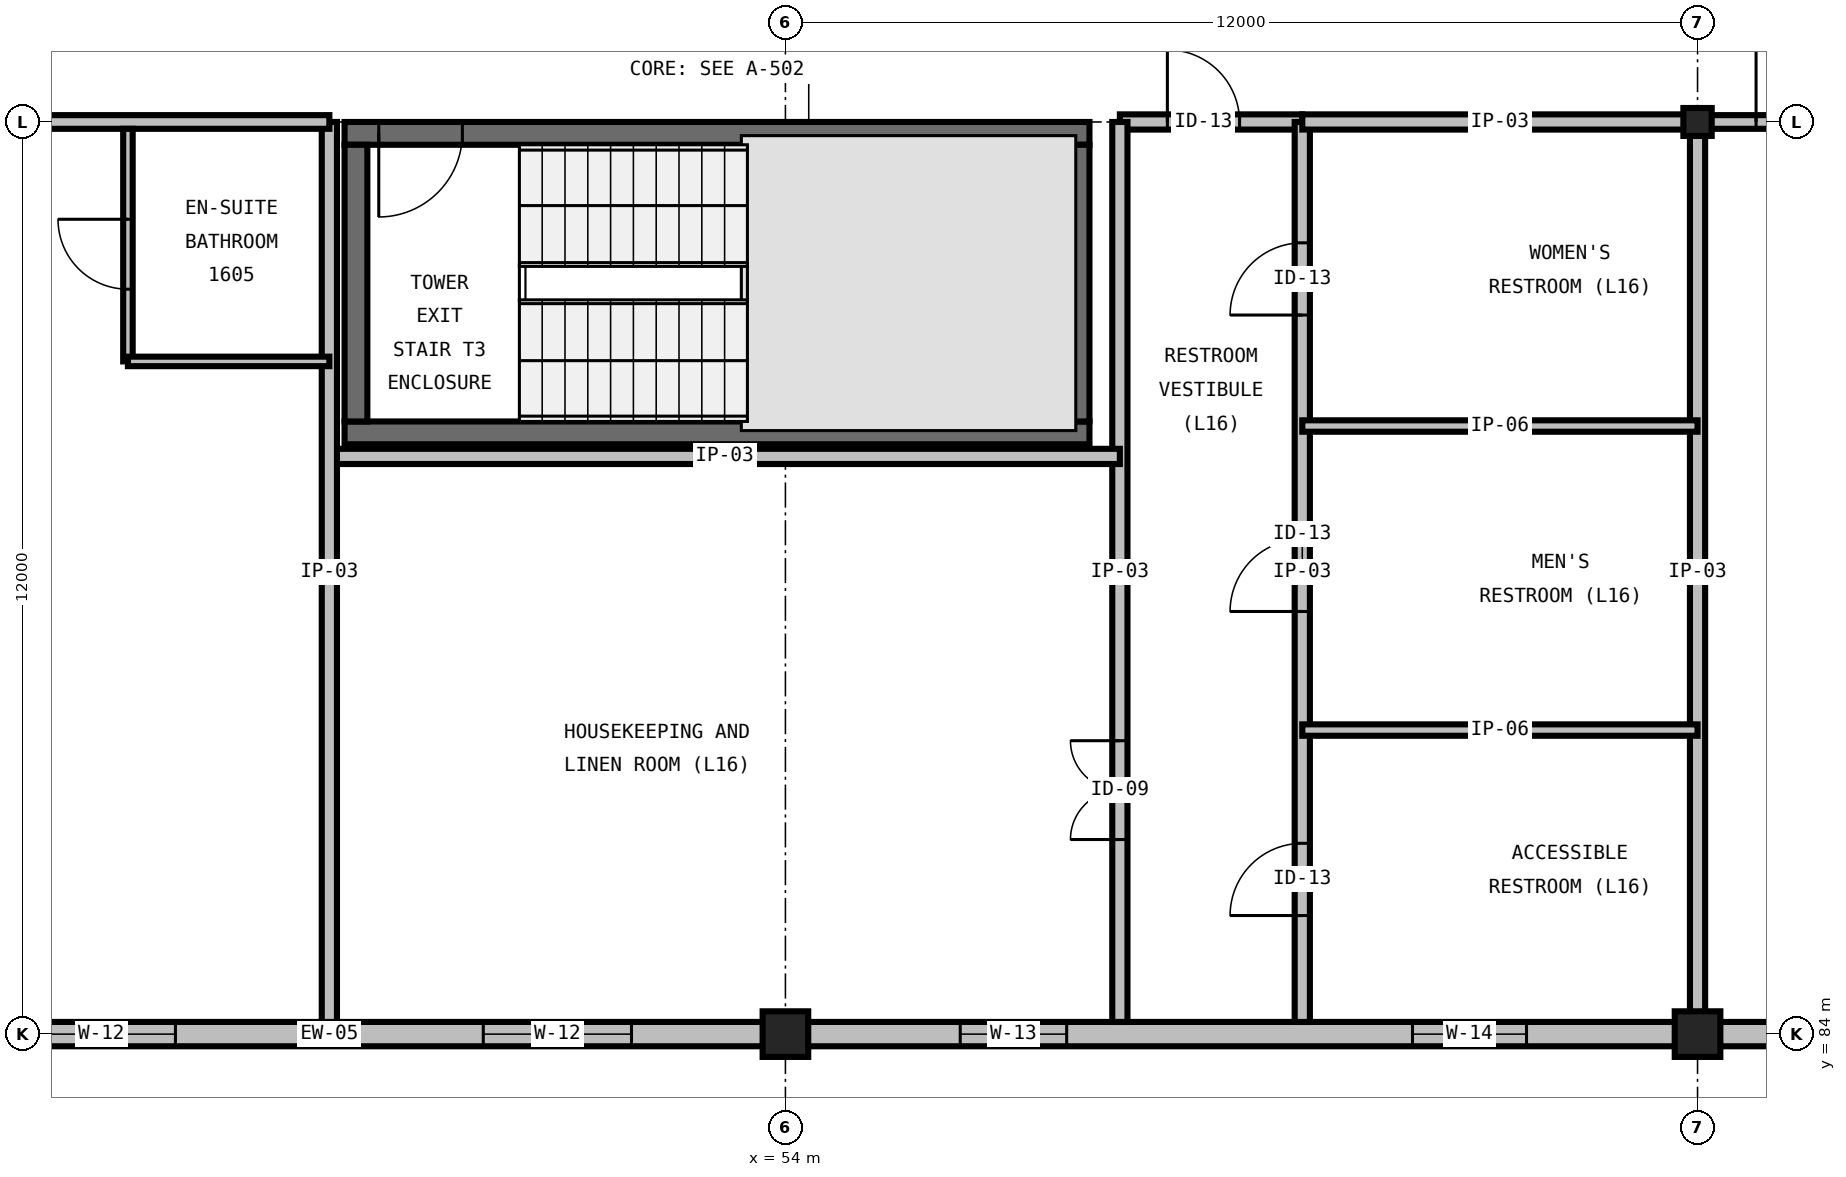
"""IFC4 building model, lengths in metres.
Left out: names, types, materials, properties, quantities, classifications, styles, units other than length and angle.
Written with IfcOpenShell. Run it as: python <this file> out.ifc"""

import sys

from ifc_helpers import new_model, si_unit, direction, frame, frame_2d, origin, origin_2d, place, context, subcontext, project, spatial, rectangle, i_section, extrude, element, fill, save


model = new_model("IFC4")
c1 = context("Model", 3, precision=1e-05, world=origin(), true_north=direction((0.0, 1.0)))
c2 = subcontext(c1, "Body", "Model", "MODEL_VIEW")
j1 = project(units=[si_unit("LENGTHUNIT", "METRE"), si_unit("PLANEANGLEUNIT", "RADIAN")], contexts=[c1])
p1 = place(None, origin())
s1 = spatial("IfcSite", under=j1, at=p1, CompositionType="ELEMENT")
p2 = place(p1, origin())
s2 = spatial("IfcBuilding", under=s1, at=p2, CompositionType="ELEMENT")
p3 = place(p2, frame((0.0, 0.0, 67.2)))
s3 = spatial("IfcBuildingStorey", under=s2, at=p3, CompositionType="ELEMENT", Elevation=67.2)
for number, where, z_axis, x_axis in (
    (1, (54.0, 84.0, 0.0), (0.0, 0.0, 1.0), (1.0, 0.0, 0.0)),
    (2, (66.0, 84.0, 0.0), (0.0, 0.0, 1.0), (1.0, 0.0, 0.0)),
):
    element("IfcColumn", number, at=place(p3, frame(where, z_axis=z_axis, x_axis=x_axis)), inside=s3, PredefinedType="COLUMN", context=c2, shape_type="SweptSolid", body=[
        extrude(rectangle(XDim=0.6, YDim=0.6, at=origin_2d()), origin(), (0.0, 0.0, 1.0), 3.6),
    ])
p4 = place(p3, frame((66.0, 96.0, 0.0), z_axis=(0.0, 0.0, 1.0), x_axis=(1.0, 0.0, 0.0)))
e3 = element("IfcColumn", 3, at=p4, inside=s3, PredefinedType="COLUMN", context=c2, shape_type="SweptSolid", body=[
    extrude(i_section(OverallWidth=0.373, OverallDepth=0.368, WebThickness=0.015, FlangeThickness=0.024, FilletRadius=0.031, at=origin_2d()), origin(), (0.0, 0.0, 1.0), 3.6),
])
p5 = place(p3, frame((48.2, 91.91, 0.0), z_axis=(0.0, 0.0, 1.0), x_axis=(1.0, 0.0, 0.0)))
e4 = element("IfcWall", 4, at=p5, inside=s3, PredefinedType="SHEAR", context=c2, shape_type="SweptSolid", body=[
    extrude(rectangle(XDim=9.8, YDim=0.3, at=frame_2d((4.9, 0.0))), origin(), (0.0, 0.0, 1.0), 3.6),
])
p6 = place(p3, frame((58.0, 95.85, 0.0), z_axis=(0.0, 0.0, 1.0), x_axis=(-1.0, 0.0, 0.0)))
e5 = element("IfcWall", 5, at=p6, inside=s3, PredefinedType="SHEAR", context=c2, shape_type="SweptSolid", body=[
    extrude(rectangle(XDim=9.8, YDim=0.3, at=frame_2d((4.9, 0.0))), origin(), (0.0, 0.0, 1.0), 3.6),
])
p7 = place(p6, frame((8.25, 0.0, 0.0)))
e6 = element("IfcOpeningElement", 6, at=p7, cuts=e5, PredefinedType="OPENING", context=c2, shape_type="SweptSolid", body=[
    extrude(rectangle(XDim=1.1, YDim=2.2, at=frame_2d((0.55, 1.1))), frame((0.0, 0.165, 0.0), z_axis=(0.0, -1.0, 0.0), x_axis=(1.0, 0.0, 0.0)), (0.0, 0.0, 1.0), 0.33),
])
for number, where, z_axis, x_axis in (
    (7, (48.35, 95.7, 0.0), (0.0, 0.0, 1.0), (0.0, -1.0, 0.0)),
    (8, (57.85, 92.06, 0.0), (0.0, 0.0, 1.0), (0.0, 1.0, 0.0)),
):
    element("IfcWall", number, at=place(p3, frame(where, z_axis=z_axis, x_axis=x_axis)), inside=s3, PredefinedType="SHEAR", context=c2, shape_type="SweptSolid", body=[
        extrude(rectangle(XDim=3.64, YDim=0.3, at=frame_2d((1.82, 0.0))), origin(), (0.0, 0.0, 1.0), 3.6),
    ])
p8 = place(p3, frame((42.0, 84.0, 0.0), z_axis=(0.0, 0.0, 1.0), x_axis=(1.0, 0.0, 0.0)))
e9 = element("IfcWall", 9, at=p8, inside=s3, PredefinedType="STANDARD", context=c2, shape_type="SweptSolid", body=[
    extrude(rectangle(XDim=12.0, YDim=0.32, at=frame_2d((6.0, 0.0))), origin(), (0.0, 0.0, 1.0), 2.526),
])
p9 = place(p8, frame((2.025, 0.0, 0.65)))
e10 = element("IfcOpeningElement", 10, at=p9, cuts=e9, PredefinedType="OPENING", context=c2, shape_type="SweptSolid", body=[
    extrude(rectangle(XDim=1.95, YDim=1.55, at=frame_2d((0.975, 0.775))), frame((0.0, 0.175, 0.0), z_axis=(0.0, -1.0, 0.0), x_axis=(1.0, 0.0, 0.0)), (0.0, 0.0, 1.0), 0.35),
])
p10 = place(p8, frame((8.025, 0.0, 0.65)))
e11 = element("IfcOpeningElement", 11, at=p10, cuts=e9, PredefinedType="OPENING", context=c2, shape_type="SweptSolid", body=[
    extrude(rectangle(XDim=1.95, YDim=1.55, at=frame_2d((0.975, 0.775))), frame((0.0, 0.175, 0.0), z_axis=(0.0, -1.0, 0.0), x_axis=(1.0, 0.0, 0.0)), (0.0, 0.0, 1.0), 0.35),
])
p11 = place(p3, frame((54.0, 84.0, 0.0), z_axis=(0.0, 0.0, 1.0), x_axis=(1.0, 0.0, 0.0)))
e12 = element("IfcWall", 12, at=p11, inside=s3, PredefinedType="STANDARD", context=c2, shape_type="SweptSolid", body=[
    extrude(rectangle(XDim=12.0, YDim=0.32, at=frame_2d((6.0, 0.0))), origin(), (0.0, 0.0, 1.0), 2.526),
])
p12 = place(p11, frame((2.3, 0.0, 1.0)))
e13 = element("IfcOpeningElement", 13, at=p12, cuts=e12, PredefinedType="OPENING", context=c2, shape_type="SweptSolid", body=[
    extrude(rectangle(XDim=1.4, YDim=1.4, at=frame_2d((0.7, 0.7))), frame((0.0, 0.175, 0.0), z_axis=(0.0, -1.0, 0.0), x_axis=(1.0, 0.0, 0.0)), (0.0, 0.0, 1.0), 0.35),
])
p13 = place(p11, frame((8.25, 0.0, 1.0)))
e14 = element("IfcOpeningElement", 14, at=p13, cuts=e12, PredefinedType="OPENING", context=c2, shape_type="SweptSolid", body=[
    extrude(rectangle(XDim=1.5, YDim=1.35, at=frame_2d((0.75, 0.675))), frame((0.0, 0.175, 0.0), z_axis=(0.0, -1.0, 0.0), x_axis=(1.0, 0.0, 0.0)), (0.0, 0.0, 1.0), 0.35),
])
p14 = place(p3, frame((66.0, 84.0, 0.0), z_axis=(0.0, 0.0, 1.0), x_axis=(1.0, 0.0, 0.0)))
e15 = element("IfcWall", 15, at=p14, inside=s3, PredefinedType="STANDARD", context=c2, shape_type="SweptSolid", body=[
    extrude(rectangle(XDim=12.0, YDim=0.32, at=frame_2d((6.0, 0.0))), origin(), (0.0, 0.0, 1.0), 2.526),
])
p15 = place(p14, frame((2.025, 0.0, 0.65)))
e16 = element("IfcOpeningElement", 16, at=p15, cuts=e15, PredefinedType="OPENING", context=c2, shape_type="SweptSolid", body=[
    extrude(rectangle(XDim=1.95, YDim=1.55, at=frame_2d((0.975, 0.775))), frame((0.0, 0.175, 0.0), z_axis=(0.0, -1.0, 0.0), x_axis=(1.0, 0.0, 0.0)), (0.0, 0.0, 1.0), 0.35),
])
p16 = place(p14, frame((8.025, 0.0, 0.65)))
e17 = element("IfcOpeningElement", 17, at=p16, cuts=e15, PredefinedType="OPENING", context=c2, shape_type="SweptSolid", body=[
    extrude(rectangle(XDim=1.95, YDim=1.55, at=frame_2d((0.975, 0.775))), frame((0.0, 0.175, 0.0), z_axis=(0.0, -1.0, 0.0), x_axis=(1.0, 0.0, 0.0)), (0.0, 0.0, 1.0), 0.35),
])
p17 = place(p3, frame((58.4, 96.0, 0.0), z_axis=(0.0, 0.0, 1.0), x_axis=(1.0, 0.0, 0.0)))
e18 = element("IfcWall", 18, at=p17, inside=s3, PredefinedType="PARTITIONING", context=c2, shape_type="SweptSolid", body=[
    extrude(rectangle(XDim=2.4, YDim=0.2, at=frame_2d((1.2, 0.0))), origin(), (0.0, 0.0, 1.0), 2.349),
])
p18 = place(p17, frame((0.625, 0.0, 0.0)))
e19 = element("IfcOpeningElement", 19, at=p18, cuts=e18, PredefinedType="OPENING", context=c2, shape_type="SweptSolid", body=[
    extrude(rectangle(XDim=0.95, YDim=2.15, at=frame_2d((0.475, 1.075))), frame((0.0, 0.115, 0.0), z_axis=(0.0, -1.0, 0.0), x_axis=(1.0, 0.0, 0.0)), (0.0, 0.0, 1.0), 0.23),
])
p19 = place(p3, frame((58.4, 84.16, 0.0), z_axis=(0.0, 0.0, 1.0), x_axis=(0.0, 1.0, 0.0)))
e20 = element("IfcWall", 20, at=p19, inside=s3, PredefinedType="PARTITIONING", context=c2, shape_type="SweptSolid", body=[
    extrude(rectangle(XDim=11.84, YDim=0.2, at=frame_2d((5.92, 0.0))), origin(), (0.0, 0.0, 1.0), 3.28),
])
p20 = place(p19, frame((2.4, 0.0, 0.0)))
e21 = element("IfcOpeningElement", 21, at=p20, cuts=e20, PredefinedType="OPENING", context=c2, shape_type="SweptSolid", body=[
    extrude(rectangle(XDim=1.3, YDim=2.2, at=frame_2d((0.65, 1.1))), frame((0.0, 0.115, 0.0), z_axis=(0.0, -1.0, 0.0), x_axis=(1.0, 0.0, 0.0)), (0.0, 0.0, 1.0), 0.23),
])
p21 = place(p3, frame((60.8, 84.16, 0.0), z_axis=(0.0, 0.0, 1.0), x_axis=(0.0, 1.0, 0.0)))
e22 = element("IfcWall", 22, at=p21, inside=s3, PredefinedType="PARTITIONING", context=c2, shape_type="SweptSolid", body=[
    extrude(rectangle(XDim=11.84, YDim=0.2, at=frame_2d((5.92, 0.0))), origin(), (0.0, 0.0, 1.0), 3.28),
])
p22 = place(p21, frame((1.4, 0.0, 0.0)))
e23 = element("IfcOpeningElement", 23, at=p22, cuts=e22, PredefinedType="OPENING", context=c2, shape_type="SweptSolid", body=[
    extrude(rectangle(XDim=0.95, YDim=2.15, at=frame_2d((0.475, 1.075))), frame((0.0, 0.115, 0.0), z_axis=(0.0, -1.0, 0.0), x_axis=(1.0, 0.0, 0.0)), (0.0, 0.0, 1.0), 0.23),
])
p23 = place(p21, frame((5.4, 0.0, 0.0)))
e24 = element("IfcOpeningElement", 24, at=p23, cuts=e22, PredefinedType="OPENING", context=c2, shape_type="SweptSolid", body=[
    extrude(rectangle(XDim=0.95, YDim=2.15, at=frame_2d((0.475, 1.075))), frame((0.0, 0.115, 0.0), z_axis=(0.0, -1.0, 0.0), x_axis=(1.0, 0.0, 0.0)), (0.0, 0.0, 1.0), 0.23),
])
p24 = place(p21, frame((9.3, 0.0, 0.0)))
e25 = element("IfcOpeningElement", 25, at=p24, cuts=e22, PredefinedType="OPENING", context=c2, shape_type="SweptSolid", body=[
    extrude(rectangle(XDim=0.95, YDim=2.15, at=frame_2d((0.475, 1.075))), frame((0.0, 0.115, 0.0), z_axis=(0.0, -1.0, 0.0), x_axis=(1.0, 0.0, 0.0)), (0.0, 0.0, 1.0), 0.23),
])
p25 = place(p3, frame((66.0, 84.16, 0.0), z_axis=(0.0, 0.0, 1.0), x_axis=(0.0, 1.0, 0.0)))
e26 = element("IfcWall", 26, at=p25, inside=s3, PredefinedType="PARTITIONING", context=c2, shape_type="SweptSolid", body=[
    extrude(rectangle(XDim=11.84, YDim=0.2, at=frame_2d((5.92, 0.0))), origin(), (0.0, 0.0, 1.0), 2.58),
])
p26 = place(p3, frame((60.8, 96.0, 0.0), z_axis=(0.0, 0.0, 1.0), x_axis=(1.0, 0.0, 0.0)))
e27 = element("IfcWall", 27, at=p26, inside=s3, PredefinedType="PARTITIONING", context=c2, shape_type="SweptSolid", body=[
    extrude(rectangle(XDim=5.2, YDim=0.2, at=frame_2d((2.6, 0.0))), origin(), (0.0, 0.0, 1.0), 2.349),
])
for number, where, z_axis, x_axis in (
    (28, (60.8, 88.0, 0.0), (0.0, 0.0, 1.0), (1.0, 0.0, 0.0)),
    (29, (60.8, 92.0, 0.0), (0.0, 0.0, 1.0), (1.0, 0.0, 0.0)),
):
    element("IfcWall", number, at=place(p3, frame(where, z_axis=z_axis, x_axis=x_axis)), inside=s3, PredefinedType="PARTITIONING", context=c2, shape_type="SweptSolid", body=[
        extrude(rectangle(XDim=5.2, YDim=0.15, at=frame_2d((2.6, 0.0))), origin(), (0.0, 0.0, 1.0), 3.28),
    ])
p27 = place(p3, frame((48.0, 91.6, 0.0), z_axis=(0.0, 0.0, 1.0), x_axis=(1.0, 0.0, 0.0)))
e30 = element("IfcWall", 30, at=p27, inside=s3, PredefinedType="PARTITIONING", context=c2, shape_type="SweptSolid", body=[
    extrude(rectangle(XDim=10.4, YDim=0.2, at=frame_2d((5.2, 0.0))), origin(), (0.0, 0.0, 1.0), 3.28),
])
p28 = place(p3, frame((48.0, 84.16, 0.0), z_axis=(0.0, 0.0, 1.0), x_axis=(0.0, 1.0, 0.0)))
e31 = element("IfcWall", 31, at=p28, inside=s3, PredefinedType="PARTITIONING", context=c2, shape_type="SweptSolid", body=[
    extrude(rectangle(XDim=11.84, YDim=0.2, at=frame_2d((5.92, 0.0))), origin(), (0.0, 0.0, 1.0), 3.28),
])
p29 = place(p3, frame((36.085, 96.0, 0.0), z_axis=(0.0, 0.0, 1.0), x_axis=(1.0, 0.0, 0.0)))
e32 = element("IfcWall", 32, at=p29, inside=s3, PredefinedType="PARTITIONING", context=c2, shape_type="SweptSolid", body=[
    extrude(rectangle(XDim=11.915, YDim=0.18, at=frame_2d((5.957, 0.0))), origin(), (0.0, 0.0, 1.0), 2.349),
])
p30 = place(p29, frame((0.685, 0.0, 0.0)))
e33 = element("IfcOpeningElement", 33, at=p30, cuts=e32, PredefinedType="OPENING", context=c2, shape_type="SweptSolid", body=[
    extrude(rectangle(XDim=1.1, YDim=2.2, at=frame_2d((0.55, 1.1))), frame((0.0, 0.105, 0.0), z_axis=(0.0, -1.0, 0.0), x_axis=(1.0, 0.0, 0.0)), (0.0, 0.0, 1.0), 0.21),
])
p31 = place(p3, frame((45.35, 92.85, 0.0), z_axis=(0.0, 0.0, 1.0), x_axis=(0.0, 1.0, 0.0)))
e34 = element("IfcWall", 34, at=p31, inside=s3, PredefinedType="PARTITIONING", context=c2, shape_type="SweptSolid", body=[
    extrude(rectangle(XDim=3.06, YDim=0.125, at=frame_2d((1.53, 0.0))), origin(), (0.0, 0.0, 1.0), 3.28),
])
p32 = place(p31, frame((0.95, 0.0, 0.0)))
e35 = element("IfcOpeningElement", 35, at=p32, cuts=e34, PredefinedType="OPENING", context=c2, shape_type="SweptSolid", body=[
    extrude(rectangle(XDim=0.92, YDim=2.1, at=frame_2d((0.46, 1.05))), frame((0.0, 0.077, 0.0), z_axis=(0.0, -1.0, 0.0), x_axis=(1.0, 0.0, 0.0)), (0.0, 0.0, 1.0), 0.155),
])
p33 = place(p3, frame((45.35, 92.85, 0.0), z_axis=(0.0, 0.0, 1.0), x_axis=(1.0, 0.0, 0.0)))
e36 = element("IfcWall", 36, at=p33, inside=s3, PredefinedType="PARTITIONING", context=c2, shape_type="SweptSolid", body=[
    extrude(rectangle(XDim=2.65, YDim=0.125, at=frame_2d((1.325, 0.0))), origin(), (0.0, 0.0, 1.0), 3.28),
])
p34 = place(p3, frame((66.0, 96.0, 0.0), z_axis=(0.0, 0.0, 1.0), x_axis=(1.0, 0.0, 0.0)))
e37 = element("IfcWall", 37, at=p34, inside=s3, PredefinedType="PARTITIONING", context=c2, shape_type="SweptSolid", body=[
    extrude(rectangle(XDim=11.915, YDim=0.18, at=frame_2d((5.957, 0.0))), origin(), (0.0, 0.0, 1.0), 2.654),
])
p35 = place(p34, frame((0.77, 0.0, 0.0)))
e38 = element("IfcOpeningElement", 38, at=p35, cuts=e37, PredefinedType="OPENING", context=c2, shape_type="SweptSolid", body=[
    extrude(rectangle(XDim=1.1, YDim=2.2, at=frame_2d((0.55, 1.1))), frame((0.0, 0.105, 0.0), z_axis=(0.0, -1.0, 0.0), x_axis=(1.0, 0.0, 0.0)), (0.0, 0.0, 1.0), 0.21),
])
p36 = place(p7, origin())
e39 = element("IfcDoor", 39, at=p36, inside=s3, OperationType="SINGLE_SWING_RIGHT", PredefinedType="DOOR", context=c2, shape_type="SweptSolid", body=[
    extrude(rectangle(XDim=1.1, YDim=2.2, at=frame_2d((0.55, 1.1))), frame((0.0, 0.025, 0.0), z_axis=(0.0, -1.0, 0.0), x_axis=(1.0, 0.0, 0.0)), (0.0, 0.0, 1.0), 0.05),
])
fill(e6, e39)
p37 = place(p9, origin())
e40 = element("IfcWindow", 40, at=p37, inside=s3, PartitioningType="DOUBLE_PANEL_VERTICAL", PredefinedType="WINDOW", context=c2, shape_type="SweptSolid", body=[
    extrude(rectangle(XDim=1.95, YDim=1.55, at=frame_2d((0.975, 0.775))), frame((0.0, 0.03, 0.0), z_axis=(0.0, -1.0, 0.0), x_axis=(1.0, 0.0, 0.0)), (0.0, 0.0, 1.0), 0.06),
])
fill(e10, e40)
p38 = place(p10, origin())
e41 = element("IfcWindow", 41, at=p38, inside=s3, PartitioningType="DOUBLE_PANEL_VERTICAL", PredefinedType="WINDOW", context=c2, shape_type="SweptSolid", body=[
    extrude(rectangle(XDim=1.95, YDim=1.55, at=frame_2d((0.975, 0.775))), frame((0.0, 0.03, 0.0), z_axis=(0.0, -1.0, 0.0), x_axis=(1.0, 0.0, 0.0)), (0.0, 0.0, 1.0), 0.06),
])
fill(e11, e41)
p39 = place(p12, origin())
e42 = element("IfcWindow", 42, at=p39, inside=s3, PartitioningType="SINGLE_PANEL", PredefinedType="WINDOW", context=c2, shape_type="SweptSolid", body=[
    extrude(rectangle(XDim=1.4, YDim=1.4, at=frame_2d((0.7, 0.7))), frame((0.0, 0.03, 0.0), z_axis=(0.0, -1.0, 0.0), x_axis=(1.0, 0.0, 0.0)), (0.0, 0.0, 1.0), 0.06),
])
fill(e13, e42)
p40 = place(p13, origin())
e43 = element("IfcWindow", 43, at=p40, inside=s3, PartitioningType="SINGLE_PANEL", PredefinedType="WINDOW", context=c2, shape_type="SweptSolid", body=[
    extrude(rectangle(XDim=1.5, YDim=1.35, at=frame_2d((0.75, 0.675))), frame((0.0, 0.03, 0.0), z_axis=(0.0, -1.0, 0.0), x_axis=(1.0, 0.0, 0.0)), (0.0, 0.0, 1.0), 0.06),
])
fill(e14, e43)
p41 = place(p18, origin())
e44 = element("IfcDoor", 44, at=p41, inside=s3, OperationType="SINGLE_SWING_LEFT", PredefinedType="DOOR", context=c2, shape_type="SweptSolid", body=[
    extrude(rectangle(XDim=0.95, YDim=2.15, at=frame_2d((0.475, 1.075))), frame((0.0, 0.025, 0.0), z_axis=(0.0, -1.0, 0.0), x_axis=(1.0, 0.0, 0.0)), (0.0, 0.0, 1.0), 0.05),
])
fill(e19, e44)
p42 = place(p20, origin())
e45 = element("IfcDoor", 45, at=p42, inside=s3, OperationType="DOUBLE_DOOR_SINGLE_SWING", PredefinedType="DOOR", context=c2, shape_type="SweptSolid", body=[
    extrude(rectangle(XDim=1.3, YDim=2.2, at=frame_2d((0.65, 1.1))), frame((0.0, 0.025, 0.0), z_axis=(0.0, -1.0, 0.0), x_axis=(1.0, 0.0, 0.0)), (0.0, 0.0, 1.0), 0.05),
])
fill(e21, e45)
p43 = place(p22, origin())
e46 = element("IfcDoor", 46, at=p43, inside=s3, OperationType="SINGLE_SWING_LEFT", PredefinedType="DOOR", context=c2, shape_type="SweptSolid", body=[
    extrude(rectangle(XDim=0.95, YDim=2.15, at=frame_2d((0.475, 1.075))), frame((0.0, 0.025, 0.0), z_axis=(0.0, -1.0, 0.0), x_axis=(1.0, 0.0, 0.0)), (0.0, 0.0, 1.0), 0.05),
])
fill(e23, e46)
p44 = place(p23, origin())
e47 = element("IfcDoor", 47, at=p44, inside=s3, OperationType="SINGLE_SWING_LEFT", PredefinedType="DOOR", context=c2, shape_type="SweptSolid", body=[
    extrude(rectangle(XDim=0.95, YDim=2.15, at=frame_2d((0.475, 1.075))), frame((0.0, 0.025, 0.0), z_axis=(0.0, -1.0, 0.0), x_axis=(1.0, 0.0, 0.0)), (0.0, 0.0, 1.0), 0.05),
])
fill(e24, e47)
p45 = place(p24, origin())
e48 = element("IfcDoor", 48, at=p45, inside=s3, OperationType="SINGLE_SWING_LEFT", PredefinedType="DOOR", context=c2, shape_type="SweptSolid", body=[
    extrude(rectangle(XDim=0.95, YDim=2.15, at=frame_2d((0.475, 1.075))), frame((0.0, 0.025, 0.0), z_axis=(0.0, -1.0, 0.0), x_axis=(1.0, 0.0, 0.0)), (0.0, 0.0, 1.0), 0.05),
])
fill(e25, e48)
p46 = place(p32, origin())
e49 = element("IfcDoor", 49, at=p46, inside=s3, OperationType="SINGLE_SWING_RIGHT", PredefinedType="DOOR", context=c2, shape_type="SweptSolid", body=[
    extrude(rectangle(XDim=0.92, YDim=2.1, at=frame_2d((0.46, 1.05))), frame((0.0, 0.025, 0.0), z_axis=(0.0, -1.0, 0.0), x_axis=(1.0, 0.0, 0.0)), (0.0, 0.0, 1.0), 0.05),
])
fill(e35, e49)
p47 = place(p35, origin())
e50 = element("IfcDoor", 50, at=p47, inside=s3, OperationType="SINGLE_SWING_LEFT", PredefinedType="DOOR", context=c2, shape_type="SweptSolid", body=[
    extrude(rectangle(XDim=1.1, YDim=2.2, at=frame_2d((0.55, 1.1))), frame((0.0, 0.025, 0.0), z_axis=(0.0, -1.0, 0.0), x_axis=(1.0, 0.0, 0.0)), (0.0, 0.0, 1.0), 0.05),
])
fill(e38, e50)
save(model, sys.argv[1])
